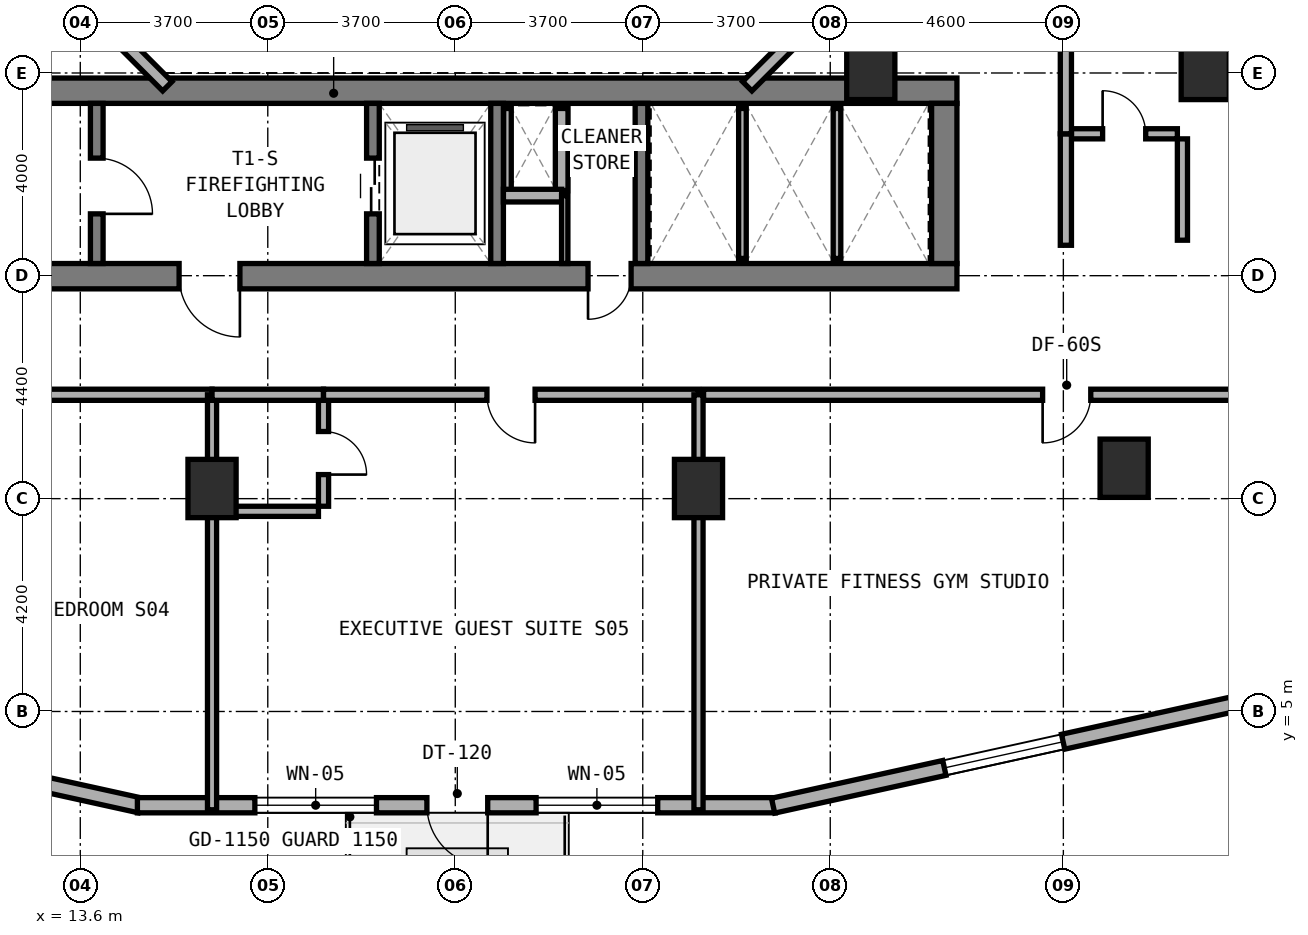
"""IFC4 building model, lengths in metres.
Left out: names, types, materials, properties, quantities, classifications, styles, units other than length and angle.
Written with IfcOpenShell. Run it as: python <this file> out.ifc"""

import sys

from ifc_helpers import new_model, si_unit, direction, frame, frame_2d, origin, origin_2d, place, context, subcontext, project, spatial, rectangle, extrude, element, fill, save


model = new_model("IFC4")
c1 = context("Model", 3, precision=1e-05, world=origin(), true_north=direction((0.0, 1.0)))
c2 = subcontext(c1, "Body", "Model", "MODEL_VIEW")
j1 = project(units=[si_unit("LENGTHUNIT", "METRE"), si_unit("PLANEANGLEUNIT", "RADIAN")], contexts=[c1])
p1 = place(None, origin())
s1 = spatial("IfcSite", under=j1, at=p1, CompositionType="ELEMENT")
p2 = place(p1, origin())
s2 = spatial("IfcBuilding", under=s1, at=p2, CompositionType="ELEMENT")
p3 = place(p2, frame((0.0, 0.0, 69.5)))
s3 = spatial("IfcBuildingStorey", under=s2, at=p3, CompositionType="ELEMENT", Elevation=69.5)
p4 = place(p3, frame((6.3, 13.59, 0.0), z_axis=(0.0, 0.0, 1.0), x_axis=(1.0, 0.0, 0.0)))
e1 = element("IfcWall", 1, at=p4, inside=s3, PredefinedType="SHEAR", context=c2, shape_type="SweptSolid", body=[
    extrude(rectangle(XDim=24.6, YDim=0.5, at=frame_2d((12.3, 0.0))), origin(), (0.0, 0.0, 1.0), 3.5),
])
p5 = place(p4, frame((9.25, 0.0, 0.0)))
e2 = element("IfcOpeningElement", 2, at=p5, cuts=e1, PredefinedType="OPENING", context=c2, shape_type="SweptSolid", body=[
    extrude(rectangle(XDim=1.2, YDim=2.15, at=frame_2d((0.6, 1.075))), frame((0.0, 0.26, 0.0), z_axis=(0.0, -1.0, 0.0), x_axis=(1.0, 0.0, 0.0)), (0.0, 0.0, 1.0), 0.52),
])
p6 = place(p4, frame((17.32, 0.0, 0.0)))
e3 = element("IfcOpeningElement", 3, at=p6, cuts=e1, PredefinedType="OPENING", context=c2, shape_type="SweptSolid", body=[
    extrude(rectangle(XDim=0.85, YDim=2.1, at=frame_2d((0.425, 1.05))), frame((0.0, 0.26, 0.0), z_axis=(0.0, -1.0, 0.0), x_axis=(1.0, 0.0, 0.0)), (0.0, 0.0, 1.0), 0.52),
])
p7 = place(p3, frame((6.3, 17.25, 0.0), z_axis=(0.0, 0.0, 1.0), x_axis=(1.0, 0.0, 0.0)))
e4 = element("IfcWall", 4, at=p7, inside=s3, PredefinedType="SHEAR", context=c2, shape_type="SweptSolid", body=[
    extrude(rectangle(XDim=24.6, YDim=0.5, at=frame_2d((12.3, 0.0))), origin(), (0.0, 0.0, 1.0), 3.5),
])
p8 = place(p3, frame((30.65, 13.84, 0.0), z_axis=(0.0, 0.0, 1.0), x_axis=(0.0, 1.0, 0.0)))
e5 = element("IfcWall", 5, at=p8, inside=s3, PredefinedType="SHEAR", context=c2, shape_type="SweptSolid", body=[
    extrude(rectangle(XDim=3.16, YDim=0.5, at=frame_2d((1.58, 0.0))), origin(), (0.0, 0.0, 1.0), 3.5),
])
p9 = place(p3, frame((13.925, 13.84, 0.0), z_axis=(0.0, 0.0, 1.0), x_axis=(0.0, 1.0, 0.0)))
e6 = element("IfcWall", 6, at=p9, inside=s3, PredefinedType="STANDARD", context=c2, shape_type="SweptSolid", body=[
    extrude(rectangle(XDim=3.16, YDim=0.25, at=frame_2d((1.58, 0.0))), origin(), (0.0, 0.0, 1.0), 3.22),
])
p10 = place(p9, frame((0.98, 0.0, 0.0)))
e7 = element("IfcOpeningElement", 7, at=p10, cuts=e6, PredefinedType="OPENING", context=c2, shape_type="SweptSolid", body=[
    extrude(rectangle(XDim=1.1, YDim=2.15, at=frame_2d((0.55, 1.075))), frame((0.0, 0.135, 0.0), z_axis=(0.0, -1.0, 0.0), x_axis=(1.0, 0.0, 0.0)), (0.0, 0.0, 1.0), 0.27),
])
p11 = place(p3, frame((19.375, 13.84, 0.0), z_axis=(0.0, 0.0, 1.0), x_axis=(0.0, 1.0, 0.0)))
e8 = element("IfcWall", 8, at=p11, inside=s3, PredefinedType="STANDARD", context=c2, shape_type="SweptSolid", body=[
    extrude(rectangle(XDim=3.16, YDim=0.25, at=frame_2d((1.58, 0.0))), origin(), (0.0, 0.0, 1.0), 3.22),
])
p12 = place(p11, frame((0.98, 0.0, 0.0)))
e9 = element("IfcOpeningElement", 9, at=p12, cuts=e8, PredefinedType="OPENING", context=c2, shape_type="SweptSolid", body=[
    extrude(rectangle(XDim=1.1, YDim=2.15, at=frame_2d((0.55, 1.075))), frame((0.0, 0.135, 0.0), z_axis=(0.0, -1.0, 0.0), x_axis=(1.0, 0.0, 0.0)), (0.0, 0.0, 1.0), 0.27),
])
for number, where, z_axis, x_axis in (
    (10, (21.825, 13.84, 0.0), (0.0, 0.0, 1.0), (0.0, 1.0, 0.0)),
    (11, (24.675, 13.84, 0.0), (0.0, 0.0, 1.0), (0.0, 1.0, 0.0)),
):
    element("IfcWall", number, at=place(p3, frame(where, z_axis=z_axis, x_axis=x_axis)), inside=s3, PredefinedType="STANDARD", context=c2, shape_type="SweptSolid", body=[
        extrude(rectangle(XDim=3.16, YDim=0.25, at=frame_2d((1.58, 0.0))), origin(), (0.0, 0.0, 1.0), 3.22),
    ])
for number, where, z_axis, x_axis in (
    (12, (16.2, 9.4, 0.0), (0.0, 0.0, 1.0), (1.0, 0.0, 0.0)),
    (13, (25.8, 9.4, 0.0), (0.0, 0.0, 1.0), (1.0, 0.0, 0.0)),
    (14, (34.2, 9.8, 0.0), (0.0, 0.0, 1.0), (1.0, 0.0, 0.0)),
    (15, (35.8, 17.65, 0.0), (0.0, 0.0, 1.0), (1.0, 0.0, 0.0)),
    (16, (29.2, 17.65, 0.0), (0.0, 0.0, 1.0), (1.0, 0.0, 0.0)),
):
    element("IfcColumn", number, at=place(p3, frame(where, z_axis=z_axis, x_axis=x_axis)), inside=s3, PredefinedType="COLUMN", context=c2, shape_type="SweptSolid", body=[
        extrude(rectangle(XDim=0.95, YDim=1.15, at=origin_2d()), origin(), (0.0, 0.0, 1.0), 3.5),
    ])
p13 = place(p3, frame((5.704, 5.148, 0.0), z_axis=(0.0, 0.0, 1.0), x_axis=(0.976539545934, -0.215338141596, 0.0)))
e17 = element("IfcWall", 17, at=p13, inside=s3, PredefinedType="STANDARD", context=c2, shape_type="SweptSolid", body=[
    extrude(rectangle(XDim=9.288, YDim=0.3, at=frame_2d((4.644, 0.0))), origin(), (0.0, 0.0, 1.0), 3.22),
])
p14 = place(p13, frame((3.444, 0.0, 0.8)))
e18 = element("IfcOpeningElement", 18, at=p14, cuts=e17, PredefinedType="OPENING", context=c2, shape_type="SweptSolid", body=[
    extrude(rectangle(XDim=2.4, YDim=1.6, at=frame_2d((1.2, 0.8))), frame((0.0, 0.16, 0.0), z_axis=(0.0, -1.0, 0.0), x_axis=(1.0, 0.0, 0.0)), (0.0, 0.0, 1.0), 0.32),
])
p15 = place(p3, frame((14.727, 3.15, 0.0), z_axis=(0.0, 0.0, 1.0), x_axis=(1.0, 0.0, 0.0)))
e19 = element("IfcWall", 19, at=p15, inside=s3, PredefinedType="STANDARD", context=c2, shape_type="SweptSolid", body=[
    extrude(rectangle(XDim=12.591, YDim=0.3, at=frame_2d((6.295, 0.0))), origin(), (0.0, 0.0, 1.0), 3.22),
])
p16 = place(p15, frame((5.713, 0.0, 0.0)))
e20 = element("IfcOpeningElement", 20, at=p16, cuts=e19, PredefinedType="OPENING", context=c2, shape_type="SweptSolid", body=[
    extrude(rectangle(XDim=1.2, YDim=2.15, at=frame_2d((0.6, 1.075))), frame((0.0, 0.16, 0.0), z_axis=(0.0, -1.0, 0.0), x_axis=(1.0, 0.0, 0.0)), (0.0, 0.0, 1.0), 0.32),
])
p17 = place(p15, frame((2.318, 0.0, 0.8)))
e21 = element("IfcOpeningElement", 21, at=p17, cuts=e19, PredefinedType="OPENING", context=c2, shape_type="SweptSolid", body=[
    extrude(rectangle(XDim=2.4, YDim=1.6, at=frame_2d((1.2, 0.8))), frame((0.0, 0.16, 0.0), z_axis=(0.0, -1.0, 0.0), x_axis=(1.0, 0.0, 0.0)), (0.0, 0.0, 1.0), 0.32),
])
p18 = place(p15, frame((7.868, 0.0, 0.8)))
e22 = element("IfcOpeningElement", 22, at=p18, cuts=e19, PredefinedType="OPENING", context=c2, shape_type="SweptSolid", body=[
    extrude(rectangle(XDim=2.4, YDim=1.6, at=frame_2d((1.2, 0.8))), frame((0.0, 0.16, 0.0), z_axis=(0.0, -1.0, 0.0), x_axis=(1.0, 0.0, 0.0)), (0.0, 0.0, 1.0), 0.32),
])
p19 = place(p3, frame((27.272, 3.141, 0.0), z_axis=(0.0, 0.0, 1.0), x_axis=(0.976555357219, 0.21526642629, 0.0)))
e23 = element("IfcWall", 23, at=p19, inside=s3, PredefinedType="STANDARD", context=c2, shape_type="SweptSolid", body=[
    extrude(rectangle(XDim=9.323, YDim=0.3, at=frame_2d((4.661, 0.0))), origin(), (0.0, 0.0, 1.0), 3.22),
])
p20 = place(p19, frame((3.461, 0.0, 0.8)))
e24 = element("IfcOpeningElement", 24, at=p20, cuts=e23, PredefinedType="OPENING", context=c2, shape_type="SweptSolid", body=[
    extrude(rectangle(XDim=2.4, YDim=1.6, at=frame_2d((1.2, 0.8))), frame((0.0, 0.16, 0.0), z_axis=(0.0, -1.0, 0.0), x_axis=(1.0, 0.0, 0.0)), (0.0, 0.0, 1.0), 0.32),
])
p21 = place(p3, frame((26.762, 17.338, 0.0), z_axis=(0.0, 0.0, 1.0), x_axis=(0.707059717605, 0.707153841636, 0.0)))
e25 = element("IfcWall", 25, at=p21, inside=s3, PredefinedType="STANDARD", context=c2, shape_type="SweptSolid", body=[
    extrude(rectangle(XDim=2.594, YDim=0.26, at=frame_2d((1.297, 0.0))), origin(), (0.0, 0.0, 1.0), 3.22),
])
p22 = place(p3, frame((13.484, 19.172, 0.0), z_axis=(0.0, 0.0, 1.0), x_axis=(0.707106781187, -0.707106781187, 0.0)))
e26 = element("IfcWall", 26, at=p22, inside=s3, PredefinedType="STANDARD", context=c2, shape_type="SweptSolid", body=[
    extrude(rectangle(XDim=2.594, YDim=0.26, at=frame_2d((1.297, 0.0))), origin(), (0.0, 0.0, 1.0), 3.22),
])
p23 = place(p3, frame((22.03, 15.28, 0.0), z_axis=(0.0, 0.0, 1.0), x_axis=(0.0, 1.0, 0.0)))
e27 = element("IfcWall", 27, at=p23, inside=s3, PredefinedType="PARTITIONING", context=c2, shape_type="SweptSolid", body=[
    extrude(rectangle(XDim=1.62, YDim=0.15, at=frame_2d((0.81, 0.0))), origin(), (0.0, 0.0, 1.0), 3.22),
])
p24 = place(p3, frame((23.1, 15.28, 0.0), z_axis=(0.0, 0.0, 1.0), x_axis=(0.0, 1.0, 0.0)))
e28 = element("IfcWall", 28, at=p24, inside=s3, PredefinedType="SOLIDWALL", context=c2, shape_type="SweptSolid", body=[
    extrude(rectangle(XDim=1.62, YDim=0.25, at=frame_2d((0.81, 0.0))), origin(), (0.0, 0.0, 1.0), 3.22),
])
p25 = place(p3, frame((21.95, 15.18, 0.0), z_axis=(0.0, 0.0, 1.0), x_axis=(1.0, 0.0, 0.0)))
e29 = element("IfcWall", 29, at=p25, inside=s3, PredefinedType="SOLIDWALL", context=c2, shape_type="SweptSolid", body=[
    extrude(rectangle(XDim=1.15, YDim=0.25, at=frame_2d((0.575, 0.0))), origin(), (0.0, 0.0, 1.0), 3.22),
])
p26 = place(p3, frame((23.16, 13.84, 0.0), z_axis=(0.0, 0.0, 1.0), x_axis=(0.0, 1.0, 0.0)))
e30 = element("IfcWall", 30, at=p26, inside=s3, PredefinedType="PARTITIONING", context=c2, shape_type="SweptSolid", body=[
    extrude(rectangle(XDim=1.34, YDim=0.125, at=frame_2d((0.67, 0.0))), origin(), (0.0, 0.0, 1.0), 3.22),
])
p27 = place(p3, frame((26.667, 13.94, 0.0), z_axis=(0.0, 0.0, 1.0), x_axis=(0.0, 1.0, 0.0)))
e31 = element("IfcWall", 31, at=p27, inside=s3, PredefinedType="PARTITIONING", context=c2, shape_type="SweptSolid", body=[
    extrude(rectangle(XDim=2.96, YDim=0.15, at=frame_2d((1.48, 0.0))), origin(), (0.0, 0.0, 1.0), 3.22),
])
p28 = place(p3, frame((28.533, 13.94, 0.0), z_axis=(0.0, 0.0, 1.0), x_axis=(0.0, 1.0, 0.0)))
e32 = element("IfcWall", 32, at=p28, inside=s3, PredefinedType="PARTITIONING", context=c2, shape_type="SweptSolid", body=[
    extrude(rectangle(XDim=2.96, YDim=0.15, at=frame_2d((1.48, 0.0))), origin(), (0.0, 0.0, 1.0), 2.495),
])
p29 = place(p3, frame((5.55, 11.25, 0.0), z_axis=(0.0, 0.0, 1.0), x_axis=(1.0, 0.0, 0.0)))
e33 = element("IfcWall", 33, at=p29, inside=s3, PredefinedType="SOLIDWALL", context=c2, shape_type="SweptSolid", body=[
    extrude(rectangle(XDim=10.65, YDim=0.22, at=frame_2d((5.325, 0.0))), origin(), (0.0, 0.0, 1.0), 2.495),
])
p30 = place(p29, frame((4.85, 0.0, 0.0)))
e34 = element("IfcOpeningElement", 34, at=p30, cuts=e33, PredefinedType="OPENING", context=c2, shape_type="SweptSolid", body=[
    extrude(rectangle(XDim=0.95, YDim=2.1, at=frame_2d((0.475, 1.05))), frame((0.0, 0.12, 0.0), z_axis=(0.0, -1.0, 0.0), x_axis=(1.0, 0.0, 0.0)), (0.0, 0.0, 1.0), 0.24),
])
p31 = place(p3, frame((16.2, 3.06, 0.0), z_axis=(0.0, 0.0, 1.0), x_axis=(0.0, 1.0, 0.0)))
e35 = element("IfcWall", 35, at=p31, inside=s3, PredefinedType="SOLIDWALL", context=c2, shape_type="SweptSolid", body=[
    extrude(rectangle(XDim=8.19, YDim=0.18, at=frame_2d((4.095, 0.0))), origin(), (0.0, 0.0, 1.0), 2.495),
])
p32 = place(p3, frame((18.4, 9.05, 0.0), z_axis=(0.0, 0.0, 1.0), x_axis=(0.0, 1.0, 0.0)))
e36 = element("IfcWall", 36, at=p32, inside=s3, PredefinedType="PLUMBINGWALL", context=c2, shape_type="SweptSolid", body=[
    extrude(rectangle(XDim=2.1, YDim=0.2, at=frame_2d((1.05, 0.0))), origin(), (0.0, 0.0, 1.0), 2.745),
])
p33 = place(p32, frame((0.625, 0.0, 0.0)))
e37 = element("IfcOpeningElement", 37, at=p33, cuts=e36, PredefinedType="OPENING", context=c2, shape_type="SweptSolid", body=[
    extrude(rectangle(XDim=0.85, YDim=2.1, at=frame_2d((0.425, 1.05))), frame((0.0, 0.11, 0.0), z_axis=(0.0, -1.0, 0.0), x_axis=(1.0, 0.0, 0.0)), (0.0, 0.0, 1.0), 0.22),
])
p34 = place(p3, frame((16.3, 8.95, 0.0), z_axis=(0.0, 0.0, 1.0), x_axis=(1.0, 0.0, 0.0)))
e38 = element("IfcWall", 38, at=p34, inside=s3, PredefinedType="PLUMBINGWALL", context=c2, shape_type="SweptSolid", body=[
    extrude(rectangle(XDim=2.0, YDim=0.2, at=frame_2d((1.0, 0.0))), origin(), (0.0, 0.0, 1.0), 3.22),
])
p35 = place(p3, frame((16.2, 11.25, 0.0), z_axis=(0.0, 0.0, 1.0), x_axis=(1.0, 0.0, 0.0)))
e39 = element("IfcWall", 39, at=p35, inside=s3, PredefinedType="SOLIDWALL", context=c2, shape_type="SweptSolid", body=[
    extrude(rectangle(XDim=2.2, YDim=0.22, at=frame_2d((1.1, 0.0))), origin(), (0.0, 0.0, 1.0), 2.495),
])
p36 = place(p3, frame((18.4, 11.25, 0.0), z_axis=(0.0, 0.0, 1.0), x_axis=(1.0, 0.0, 0.0)))
e40 = element("IfcWall", 40, at=p36, inside=s3, PredefinedType="SOLIDWALL", context=c2, shape_type="SweptSolid", body=[
    extrude(rectangle(XDim=7.4, YDim=0.22, at=frame_2d((3.7, 0.0))), origin(), (0.0, 0.0, 1.0), 2.495),
])
p37 = place(p36, frame((3.225, 0.0, 0.0)))
e41 = element("IfcOpeningElement", 41, at=p37, cuts=e40, PredefinedType="OPENING", context=c2, shape_type="SweptSolid", body=[
    extrude(rectangle(XDim=0.95, YDim=2.1, at=frame_2d((0.475, 1.05))), frame((0.0, 0.12, 0.0), z_axis=(0.0, -1.0, 0.0), x_axis=(1.0, 0.0, 0.0)), (0.0, 0.0, 1.0), 0.24),
])
p38 = place(p3, frame((25.8, 3.06, 0.0), z_axis=(0.0, 0.0, 1.0), x_axis=(0.0, 1.0, 0.0)))
e42 = element("IfcWall", 42, at=p38, inside=s3, PredefinedType="SOLIDWALL", context=c2, shape_type="SweptSolid", body=[
    extrude(rectangle(XDim=8.19, YDim=0.18, at=frame_2d((4.095, 0.0))), origin(), (0.0, 0.0, 1.0), 2.495),
])
p39 = place(p3, frame((25.9, 11.25, 0.0), z_axis=(0.0, 0.0, 1.0), x_axis=(1.0, 0.0, 0.0)))
e43 = element("IfcWall", 43, at=p39, inside=s3, PredefinedType="SOLIDWALL", context=c2, shape_type="SweptSolid", body=[
    extrude(rectangle(XDim=15.84, YDim=0.22, at=frame_2d((7.92, 0.0))), origin(), (0.0, 0.0, 1.0), 2.495),
])
p40 = place(p39, frame((6.691, 0.0, 0.0)))
e44 = element("IfcOpeningElement", 44, at=p40, cuts=e43, PredefinedType="OPENING", context=c2, shape_type="SweptSolid", body=[
    extrude(rectangle(XDim=0.95, YDim=2.1, at=frame_2d((0.475, 1.05))), frame((0.0, 0.12, 0.0), z_axis=(0.0, -1.0, 0.0), x_axis=(1.0, 0.0, 0.0)), (0.0, 0.0, 1.0), 0.24),
])
p41 = place(p3, frame((33.15, 16.4, 0.0), z_axis=(0.0, 0.0, 1.0), x_axis=(1.0, 0.0, 0.0)))
e45 = element("IfcWall", 45, at=p41, inside=s3, PredefinedType="PLUMBINGWALL", context=c2, shape_type="SweptSolid", body=[
    extrude(rectangle(XDim=2.1, YDim=0.2, at=frame_2d((1.05, 0.0))), origin(), (0.0, 0.0, 1.0), 3.22),
])
p42 = place(p41, frame((0.625, 0.0, 0.0)))
e46 = element("IfcOpeningElement", 46, at=p42, cuts=e45, PredefinedType="OPENING", context=c2, shape_type="SweptSolid", body=[
    extrude(rectangle(XDim=0.85, YDim=2.1, at=frame_2d((0.425, 1.05))), frame((0.0, 0.11, 0.0), z_axis=(0.0, -1.0, 0.0), x_axis=(1.0, 0.0, 0.0)), (0.0, 0.0, 1.0), 0.22),
])
p43 = place(p3, frame((35.35, 14.3, 0.0), z_axis=(0.0, 0.0, 1.0), x_axis=(0.0, 1.0, 0.0)))
e47 = element("IfcWall", 47, at=p43, inside=s3, PredefinedType="PLUMBINGWALL", context=c2, shape_type="SweptSolid", body=[
    extrude(rectangle(XDim=2.0, YDim=0.2, at=frame_2d((1.0, 0.0))), origin(), (0.0, 0.0, 1.0), 2.745),
])
p44 = place(p3, frame((33.05, 14.2, 0.0), z_axis=(0.0, 0.0, 1.0), x_axis=(0.0, 1.0, 0.0)))
e48 = element("IfcWall", 48, at=p44, inside=s3, PredefinedType="SOLIDWALL", context=c2, shape_type="SweptSolid", body=[
    extrude(rectangle(XDim=2.2, YDim=0.22, at=frame_2d((1.1, 0.0))), origin(), (0.0, 0.0, 1.0), 3.22),
])
p45 = place(p3, frame((33.05, 16.4, 0.0), z_axis=(0.0, 0.0, 1.0), x_axis=(0.0, 1.0, 0.0)))
e49 = element("IfcWall", 49, at=p45, inside=s3, PredefinedType="SOLIDWALL", context=c2, shape_type="SweptSolid", body=[
    extrude(rectangle(XDim=4.649, YDim=0.22, at=frame_2d((2.325, 0.0))), origin(), (0.0, 0.0, 1.0), 2.495),
])
p46 = place(p45, frame((1.85, 0.0, 0.0)))
e50 = element("IfcOpeningElement", 50, at=p46, cuts=e49, PredefinedType="OPENING", context=c2, shape_type="SweptSolid", body=[
    extrude(rectangle(XDim=0.95, YDim=2.1, at=frame_2d((0.475, 1.05))), frame((0.0, 0.12, 0.0), z_axis=(0.0, -1.0, 0.0), x_axis=(1.0, 0.0, 0.0)), (0.0, 0.0, 1.0), 0.24),
])
p47 = place(p16, frame((1.2, 0.0, 0.0), z_axis=(0.0, 0.0, 1.0), x_axis=(-1.0, 0.0, 0.0)))
e51 = element("IfcDoor", 51, at=p47, inside=s3, OperationType="SINGLE_SWING_LEFT", PredefinedType="DOOR", context=c2, shape_type="SweptSolid", body=[
    extrude(rectangle(XDim=1.2, YDim=2.15, at=frame_2d((0.6, 1.075))), frame((0.0, 0.025, 0.0), z_axis=(0.0, -1.0, 0.0), x_axis=(1.0, 0.0, 0.0)), (0.0, 0.0, 1.0), 0.05),
])
fill(e20, e51)
p48 = place(p17, origin())
e52 = element("IfcWindow", 52, at=p48, inside=s3, PartitioningType="SINGLE_PANEL", PredefinedType="WINDOW", context=c2, shape_type="SweptSolid", body=[
    extrude(rectangle(XDim=2.4, YDim=1.6, at=frame_2d((1.2, 0.8))), frame((0.0, 0.03, 0.0), z_axis=(0.0, -1.0, 0.0), x_axis=(1.0, 0.0, 0.0)), (0.0, 0.0, 1.0), 0.06),
])
fill(e21, e52)
p49 = place(p18, origin())
e53 = element("IfcWindow", 53, at=p49, inside=s3, PartitioningType="SINGLE_PANEL", PredefinedType="WINDOW", context=c2, shape_type="SweptSolid", body=[
    extrude(rectangle(XDim=2.4, YDim=1.6, at=frame_2d((1.2, 0.8))), frame((0.0, 0.03, 0.0), z_axis=(0.0, -1.0, 0.0), x_axis=(1.0, 0.0, 0.0)), (0.0, 0.0, 1.0), 0.06),
])
fill(e22, e53)
p50 = place(p20, origin())
e54 = element("IfcWindow", 54, at=p50, inside=s3, PartitioningType="SINGLE_PANEL", PredefinedType="WINDOW", context=c2, shape_type="SweptSolid", body=[
    extrude(rectangle(XDim=2.4, YDim=1.6, at=frame_2d((1.2, 0.8))), frame((0.0, 0.03, 0.0), z_axis=(0.0, -1.0, 0.0), x_axis=(1.0, 0.0, 0.0)), (0.0, 0.0, 1.0), 0.06),
])
fill(e24, e54)
p51 = place(p10, frame((1.1, 0.0, 0.0), z_axis=(0.0, 0.0, 1.0), x_axis=(-1.0, 0.0, 0.0)))
e55 = element("IfcDoor", 55, at=p51, inside=s3, OperationType="SINGLE_SWING_RIGHT", PredefinedType="DOOR", context=c2, shape_type="SweptSolid", body=[
    extrude(rectangle(XDim=1.1, YDim=2.15, at=frame_2d((0.55, 1.075))), frame((0.0, 0.025, 0.0), z_axis=(0.0, -1.0, 0.0), x_axis=(1.0, 0.0, 0.0)), (0.0, 0.0, 1.0), 0.05),
])
fill(e7, e55)
p52 = place(p5, frame((1.2, 0.0, 0.0), z_axis=(0.0, 0.0, 1.0), x_axis=(-1.0, 0.0, 0.0)))
e56 = element("IfcDoor", 56, at=p52, inside=s3, OperationType="SINGLE_SWING_LEFT", PredefinedType="DOOR", context=c2, shape_type="SweptSolid", body=[
    extrude(rectangle(XDim=1.2, YDim=2.15, at=frame_2d((0.6, 1.075))), frame((0.0, 0.025, 0.0), z_axis=(0.0, -1.0, 0.0), x_axis=(1.0, 0.0, 0.0)), (0.0, 0.0, 1.0), 0.05),
])
fill(e2, e56)
p53 = place(p12, origin())
e57 = element("IfcDoor", 57, at=p53, inside=s3, OperationType="DOUBLE_DOOR_SLIDING", PredefinedType="DOOR", context=c2, shape_type="SweptSolid", body=[
    extrude(rectangle(XDim=1.1, YDim=2.15, at=frame_2d((0.55, 1.075))), frame((0.0, 0.025, 0.0), z_axis=(0.0, -1.0, 0.0), x_axis=(1.0, 0.0, 0.0)), (0.0, 0.0, 1.0), 0.05),
])
fill(e9, e57)
p54 = place(p6, frame((0.85, 0.0, 0.0), z_axis=(0.0, 0.0, 1.0), x_axis=(-1.0, 0.0, 0.0)))
e58 = element("IfcDoor", 58, at=p54, inside=s3, OperationType="SINGLE_SWING_RIGHT", PredefinedType="DOOR", context=c2, shape_type="SweptSolid", body=[
    extrude(rectangle(XDim=0.85, YDim=2.1, at=frame_2d((0.425, 1.05))), frame((0.0, 0.025, 0.0), z_axis=(0.0, -1.0, 0.0), x_axis=(1.0, 0.0, 0.0)), (0.0, 0.0, 1.0), 0.05),
])
fill(e3, e58)
p55 = place(p33, frame((0.85, 0.0, 0.0), z_axis=(0.0, 0.0, 1.0), x_axis=(-1.0, 0.0, 0.0)))
e59 = element("IfcDoor", 59, at=p55, inside=s3, OperationType="SINGLE_SWING_RIGHT", PredefinedType="DOOR", context=c2, shape_type="SweptSolid", body=[
    extrude(rectangle(XDim=0.85, YDim=2.1, at=frame_2d((0.425, 1.05))), frame((0.0, 0.025, 0.0), z_axis=(0.0, -1.0, 0.0), x_axis=(1.0, 0.0, 0.0)), (0.0, 0.0, 1.0), 0.05),
])
fill(e37, e59)
p56 = place(p37, frame((0.95, 0.0, 0.0), z_axis=(0.0, 0.0, 1.0), x_axis=(-1.0, 0.0, 0.0)))
e60 = element("IfcDoor", 60, at=p56, inside=s3, OperationType="SINGLE_SWING_LEFT", PredefinedType="DOOR", context=c2, shape_type="SweptSolid", body=[
    extrude(rectangle(XDim=0.95, YDim=2.1, at=frame_2d((0.475, 1.05))), frame((0.0, 0.025, 0.0), z_axis=(0.0, -1.0, 0.0), x_axis=(1.0, 0.0, 0.0)), (0.0, 0.0, 1.0), 0.05),
])
fill(e41, e60)
p57 = place(p40, frame((0.95, 0.0, 0.0), z_axis=(0.0, 0.0, 1.0), x_axis=(-1.0, 0.0, 0.0)))
e61 = element("IfcDoor", 61, at=p57, inside=s3, OperationType="SINGLE_SWING_RIGHT", PredefinedType="DOOR", context=c2, shape_type="SweptSolid", body=[
    extrude(rectangle(XDim=0.95, YDim=2.1, at=frame_2d((0.475, 1.05))), frame((0.0, 0.025, 0.0), z_axis=(0.0, -1.0, 0.0), x_axis=(1.0, 0.0, 0.0)), (0.0, 0.0, 1.0), 0.05),
])
fill(e44, e61)
p58 = place(p42, origin())
e62 = element("IfcDoor", 62, at=p58, inside=s3, OperationType="SINGLE_SWING_LEFT", PredefinedType="DOOR", context=c2, shape_type="SweptSolid", body=[
    extrude(rectangle(XDim=0.85, YDim=2.1, at=frame_2d((0.425, 1.05))), frame((0.0, 0.025, 0.0), z_axis=(0.0, -1.0, 0.0), x_axis=(1.0, 0.0, 0.0)), (0.0, 0.0, 1.0), 0.05),
])
fill(e46, e62)
save(model, sys.argv[1])
